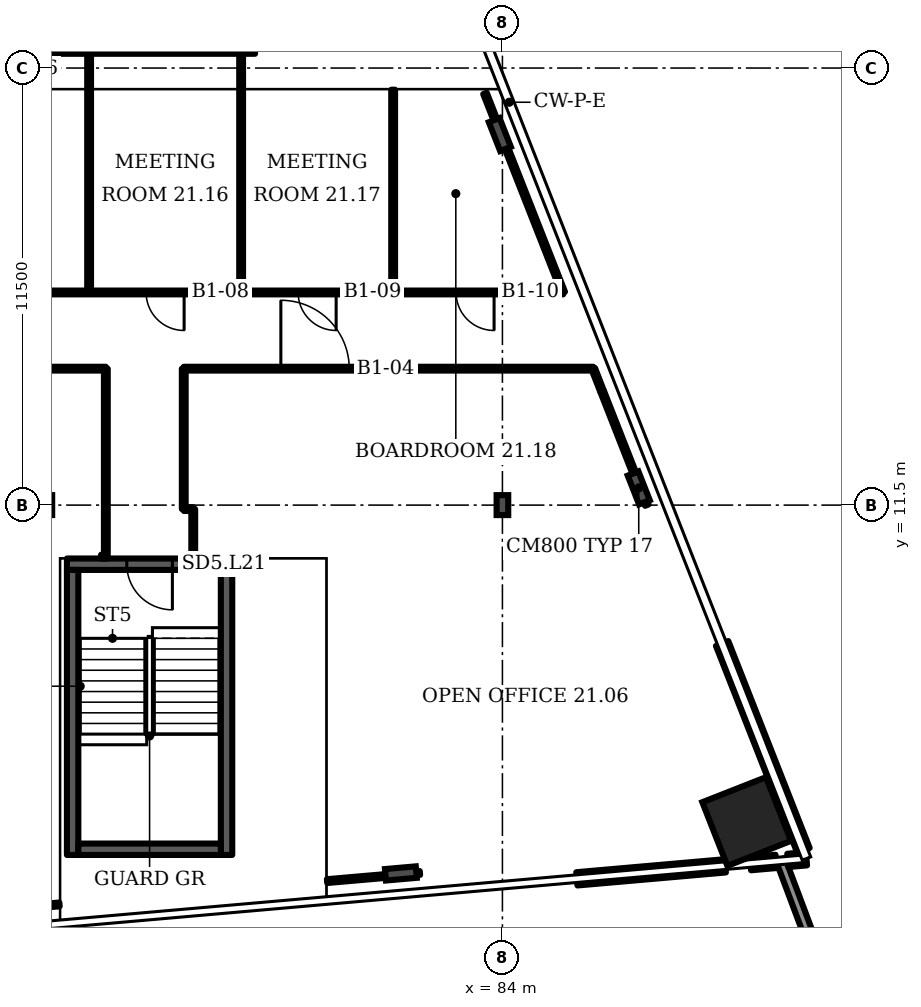
"""IFC4 building model, lengths in metres.
Left out: names, types, materials, properties, quantities, classifications, styles, units other than length and angle.
Written with IfcOpenShell. Run it as: python <this file> out.ifc"""

import sys

from ifc_helpers import new_model, si_unit, direction, frame, frame_2d, origin, origin_2d, place, context, subcontext, project, spatial, rectangle, i_section, extrude, element, fill, save


model = new_model("IFC4")
c1 = context("Model", 3, precision=1e-05, world=origin(), true_north=direction((0.0, 1.0)))
c2 = subcontext(c1, "Body", "Model", "MODEL_VIEW")
j1 = project(units=[si_unit("LENGTHUNIT", "METRE"), si_unit("PLANEANGLEUNIT", "RADIAN")], contexts=[c1])
p1 = place(None, origin())
s1 = spatial("IfcSite", under=j1, at=p1, CompositionType="ELEMENT")
p2 = place(p1, origin())
s2 = spatial("IfcBuilding", under=s1, at=p2, CompositionType="ELEMENT")
p3 = place(p2, frame((0.0, 0.0, 96.7)))
s3 = spatial("IfcBuildingStorey", under=s2, at=p3, CompositionType="ELEMENT", Elevation=96.7)
p4 = place(p3, frame((90.427, 3.174, 0.0), z_axis=(0.0, 0.0, 1.0), x_axis=(-0.365778, 0.930702, 0.0)))
e1 = element("IfcColumn", 1, at=p4, inside=s3, PredefinedType="COLUMN", context=c2, shape_type="SweptSolid", body=[
    extrude(rectangle(XDim=1.8, YDim=1.8, at=origin_2d()), origin(), (0.0, 0.0, 1.0), 3.6),
])
for number, where, z_axis, x_axis in (
    (2, (81.328, 1.808, 0.0), (0.0, 0.0, 1.0), (0.087, -0.996, 0.0)),
    (3, (87.587, 11.952, 0.0), (0.0, 0.0, 1.0), (0.931, 0.366, 0.0)),
    (4, (83.933, 21.251, 0.0), (0.0, 0.0, 1.0), (0.931, 0.366, 0.0)),
):
    element("IfcColumn", number, at=place(p3, frame(where, z_axis=z_axis, x_axis=x_axis)), inside=s3, PredefinedType="COLUMN", context=c2, shape_type="SweptSolid", body=[
        extrude(i_section(OverallWidth=0.303, OverallDepth=0.814, WebThickness=0.021, FlangeThickness=0.04, FilletRadius=0.03, at=origin_2d()), origin(), (0.0, 0.0, 1.0), 3.6),
    ])
p5 = place(p3, frame((84.0, 11.5, 0.0), z_axis=(0.0, 0.0, 1.0), x_axis=(1.0, 0.0, 0.0)))
e5 = element("IfcColumn", 5, at=p5, inside=s3, PredefinedType="COLUMN", context=c2, shape_type="SweptSolid", body=[
    extrude(i_section(OverallWidth=0.306, OverallDepth=0.524, WebThickness=0.021, FlangeThickness=0.04, FilletRadius=0.027, at=origin_2d()), origin(), (0.0, 0.0, 1.0), 3.6),
])
p6 = place(p3, frame((91.318, 2.174, 0.0), z_axis=(0.0, 0.0, 1.0), x_axis=(0.351075, -0.936343, 0.0)))
e6 = element("IfcWall", 6, at=p6, inside=s3, PredefinedType="PARAPET", context=c2, shape_type="SweptSolid", body=[
    extrude(rectangle(XDim=2.275, YDim=0.25, at=frame_2d((1.137, 0.0))), origin(), (0.0, 0.0, 1.0), 1.1),
])
p7 = place(p3, frame((85.959, 1.667, 0.0), z_axis=(0.0, 0.0, 1.0), x_axis=(0.996194, 0.087167, 0.0)))
e7 = element("IfcWall", 7, at=p7, inside=s3, PredefinedType="SOLIDWALL", context=c2, shape_type="SweptSolid", body=[
    extrude(rectangle(XDim=3.921, YDim=0.35, at=frame_2d((1.96, 0.0))), origin(), (0.0, 0.0, 1.0), 1.0),
])
p8 = place(p3, frame((90.527, 2.066, 0.0), z_axis=(0.0, 0.0, 1.0), x_axis=(0.996187, 0.087252, 0.0)))
e8 = element("IfcWall", 8, at=p8, inside=s3, PredefinedType="SOLIDWALL", context=c2, shape_type="SweptSolid", body=[
    extrude(rectangle(XDim=0.677, YDim=0.35, at=frame_2d((0.339, 0.0))), origin(), (0.0, 0.0, 1.0), 1.0),
])
p9 = place(p3, frame((91.51, 2.152, 0.0), z_axis=(0.0, 0.0, 1.0), x_axis=(0.996189, 0.087272, 0.0)))
e9 = element("IfcWall", 9, at=p9, inside=s3, PredefinedType="SOLIDWALL", context=c2, shape_type="SweptSolid", body=[
    extrude(rectangle(XDim=0.492, YDim=0.35, at=frame_2d((0.246, 0.0))), origin(), (0.0, 0.0, 1.0), 1.0),
])
p10 = place(p3, frame((91.921, 2.414, 0.0), z_axis=(0.0, 0.0, 1.0), x_axis=(-0.36578, 0.930701, 0.0)))
e10 = element("IfcWall", 10, at=p10, inside=s3, PredefinedType="SOLIDWALL", context=c2, shape_type="SweptSolid", body=[
    extrude(rectangle(XDim=5.852, YDim=0.35, at=frame_2d((2.926, 0.0))), origin(), (0.0, 0.0, 1.0), 1.0),
])
p11 = place(p3, frame((72.541, 9.945, 0.0), z_axis=(0.0, 0.0, 1.0), x_axis=(1.0, 0.0, 0.0)))
e11 = element("IfcWall", 11, at=p11, inside=s3, PredefinedType="SHEAR", context=c2, shape_type="SweptSolid", body=[
    extrude(rectangle(XDim=4.35, YDim=0.3, at=frame_2d((2.175, 0.0))), origin(), (0.0, 0.0, 1.0), 3.2),
])
p12 = place(p11, frame((1.575, 0.0, 0.0)))
e12 = element("IfcOpeningElement", 12, at=p12, cuts=e11, PredefinedType="OPENING", context=c2, shape_type="SweptSolid", body=[
    extrude(rectangle(XDim=1.2, YDim=2.1, at=frame_2d((0.6, 1.05))), frame((0.0, 0.16, 0.0), z_axis=(0.0, -1.0, 0.0), x_axis=(1.0, 0.0, 0.0)), (0.0, 0.0, 1.0), 0.32),
])
p13 = place(p3, frame((17.8, 17.095, 0.0), z_axis=(0.0, 0.0, 1.0), x_axis=(1.0, 0.0, 0.0)))
e13 = element("IfcWall", 13, at=p13, inside=s3, PredefinedType="PARTITIONING", context=c2, shape_type="SweptSolid", body=[
    extrude(rectangle(XDim=67.8, YDim=0.1, at=frame_2d((33.9, 0.0))), origin(), (0.0, 0.0, 1.0), 3.2),
])
p14 = place(p13, frame((12.0, 0.0, 0.0)))
e14 = element("IfcOpeningElement", 14, at=p14, cuts=e13, PredefinedType="OPENING", context=c2, shape_type="SweptSolid", body=[
    extrude(rectangle(XDim=1.0, YDim=2.1, at=frame_2d((0.5, 1.05))), frame((0.0, 0.06, 0.0), z_axis=(0.0, -1.0, 0.0), x_axis=(1.0, 0.0, 0.0)), (0.0, 0.0, 1.0), 0.12),
])
p15 = place(p13, frame((48.5, 0.0, 0.0)))
e15 = element("IfcOpeningElement", 15, at=p15, cuts=e13, PredefinedType="OPENING", context=c2, shape_type="SweptSolid", body=[
    extrude(rectangle(XDim=1.8, YDim=2.1, at=frame_2d((0.9, 1.05))), frame((0.0, 0.06, 0.0), z_axis=(0.0, -1.0, 0.0), x_axis=(1.0, 0.0, 0.0)), (0.0, 0.0, 1.0), 0.12),
])
p16 = place(p13, frame((56.825, 0.0, 0.0)))
e16 = element("IfcOpeningElement", 16, at=p16, cuts=e13, PredefinedType="OPENING", context=c2, shape_type="SweptSolid", body=[
    extrude(rectangle(XDim=1.0, YDim=2.1, at=frame_2d((0.5, 1.05))), frame((0.0, 0.06, 0.0), z_axis=(0.0, -1.0, 0.0), x_axis=(1.0, 0.0, 0.0)), (0.0, 0.0, 1.0), 0.12),
])
p17 = place(p13, frame((60.825, 0.0, 0.0)))
e17 = element("IfcOpeningElement", 17, at=p17, cuts=e13, PredefinedType="OPENING", context=c2, shape_type="SweptSolid", body=[
    extrude(rectangle(XDim=1.0, YDim=2.1, at=frame_2d((0.5, 1.05))), frame((0.0, 0.06, 0.0), z_axis=(0.0, -1.0, 0.0), x_axis=(1.0, 0.0, 0.0)), (0.0, 0.0, 1.0), 0.12),
])
p18 = place(p13, frame((64.981, 0.0, 0.0)))
e18 = element("IfcOpeningElement", 18, at=p18, cuts=e13, PredefinedType="OPENING", context=c2, shape_type="SweptSolid", body=[
    extrude(rectangle(XDim=1.0, YDim=2.1, at=frame_2d((0.5, 1.05))), frame((0.0, 0.06, 0.0), z_axis=(0.0, -1.0, 0.0), x_axis=(1.0, 0.0, 0.0)), (0.0, 0.0, 1.0), 0.12),
])
p19 = place(p3, frame((44.51, 15.09, 0.0), z_axis=(0.0, 0.0, 1.0), x_axis=(1.0, 0.0, 0.0)))
e19 = element("IfcWall", 19, at=p19, inside=s3, PredefinedType="PARTITIONING", context=c2, shape_type="SweptSolid", body=[
    extrude(rectangle(XDim=29.055, YDim=0.1, at=frame_2d((14.527, 0.0))), origin(), (0.0, 0.0, 1.0), 3.2),
])
p20 = place(p3, frame((69.91, 0.78, 0.0), z_axis=(0.0, 0.0, 1.0), x_axis=(0.99619, 0.087259, 0.0)))
e20 = element("IfcWall", 20, at=p20, inside=s3, PredefinedType="PARTITIONING", context=c2, shape_type="SweptSolid", body=[
    extrude(rectangle(XDim=2.445, YDim=0.1, at=frame_2d((1.223, 0.0))), origin(), (0.0, 0.0, 1.0), 2.58),
])
p21 = place(p3, frame((73.125, 17.095, 0.0), z_axis=(0.0, 0.0, 1.0), x_axis=(0.0, 1.0, 0.0)))
e21 = element("IfcWall", 21, at=p21, inside=s3, PredefinedType="PARTITIONING", context=c2, shape_type="SweptSolid", body=[
    extrude(rectangle(XDim=6.28, YDim=0.1, at=frame_2d((3.14, 0.0))), origin(), (0.0, 0.0, 1.0), 3.2),
])
p22 = place(p3, frame((73.44, 10.145, 0.0), z_axis=(0.0, 0.0, 1.0), x_axis=(1.0, 0.0, 0.0)))
e22 = element("IfcWall", 22, at=p22, inside=s3, PredefinedType="PARTITIONING", context=c2, shape_type="SweptSolid", body=[
    extrude(rectangle(XDim=0.125, YDim=0.1, at=frame_2d((0.062, 0.0))), origin(), (0.0, 0.0, 1.0), 3.2),
])
p23 = place(p3, frame((73.565, 10.095, 0.0), z_axis=(0.0, 0.0, 1.0), x_axis=(0.0, 1.0, 0.0)))
e23 = element("IfcWall", 23, at=p23, inside=s3, PredefinedType="PARTITIONING", context=c2, shape_type="SweptSolid", body=[
    extrude(rectangle(XDim=4.995, YDim=0.1, at=frame_2d((2.498, 0.0))), origin(), (0.0, 0.0, 1.0), 3.2),
])
p24 = place(p3, frame((75.615, 11.395, 0.0), z_axis=(0.0, 0.0, 1.0), x_axis=(0.0, 1.0, 0.0)))
e24 = element("IfcWall", 24, at=p24, inside=s3, PredefinedType="PARTITIONING", context=c2, shape_type="SweptSolid", body=[
    extrude(rectangle(XDim=3.695, YDim=0.1, at=frame_2d((1.848, 0.0))), origin(), (0.0, 0.0, 1.0), 3.2),
])
p25 = place(p3, frame((75.615, 15.09, 0.0), z_axis=(0.0, 0.0, 1.0), x_axis=(1.0, 0.0, 0.0)))
e25 = element("IfcWall", 25, at=p25, inside=s3, PredefinedType="PARTITIONING", context=c2, shape_type="SweptSolid", body=[
    extrude(rectangle(XDim=10.775, YDim=0.1, at=frame_2d((5.387, 0.0))), origin(), (0.0, 0.0, 1.0), 3.2),
])
p26 = place(p25, frame((2.555, 0.0, 0.0)))
e26 = element("IfcOpeningElement", 26, at=p26, cuts=e25, PredefinedType="OPENING", context=c2, shape_type="SweptSolid", body=[
    extrude(rectangle(XDim=1.8, YDim=2.1, at=frame_2d((0.9, 1.05))), frame((0.0, 0.06, 0.0), z_axis=(0.0, -1.0, 0.0), x_axis=(1.0, 0.0, 0.0)), (0.0, 0.0, 1.0), 0.12),
])
p27 = place(p3, frame((75.62, 11.395, 0.0), z_axis=(0.0, 0.0, 1.0), x_axis=(1.0, 0.0, 0.0)))
e27 = element("IfcWall", 27, at=p27, inside=s3, PredefinedType="PARTITIONING", context=c2, shape_type="SweptSolid", body=[
    extrude(rectangle(XDim=0.245, YDim=0.1, at=frame_2d((0.123, 0.0))), origin(), (0.0, 0.0, 1.0), 3.2),
])
p28 = place(p3, frame((75.865, 10.115, 0.0), z_axis=(0.0, 0.0, 1.0), x_axis=(0.0, 1.0, 0.0)))
e28 = element("IfcWall", 28, at=p28, inside=s3, PredefinedType="PARTITIONING", context=c2, shape_type="SweptSolid", body=[
    extrude(rectangle(XDim=1.28, YDim=0.1, at=frame_2d((0.64, 0.0))), origin(), (0.0, 0.0, 1.0), 3.2),
])
p29 = place(p3, frame((77.125, 17.095, 0.0), z_axis=(0.0, 0.0, 1.0), x_axis=(0.0, 1.0, 0.0)))
e29 = element("IfcWall", 29, at=p29, inside=s3, PredefinedType="PARTITIONING", context=c2, shape_type="SweptSolid", body=[
    extrude(rectangle(XDim=6.28, YDim=0.1, at=frame_2d((3.14, 0.0))), origin(), (0.0, 0.0, 1.0), 3.2),
])
p30 = place(p3, frame((79.386, 1.607, 0.0), z_axis=(0.0, 0.0, 1.0), x_axis=(0.996209, 0.086973, 0.0)))
e30 = element("IfcWall", 30, at=p30, inside=s3, PredefinedType="PARTITIONING", context=c2, shape_type="SweptSolid", body=[
    extrude(rectangle(XDim=2.453, YDim=0.1, at=frame_2d((1.227, 0.0))), origin(), (0.0, 0.0, 1.0), 2.58),
])
p31 = place(p3, frame((81.125, 17.095, 0.0), z_axis=(0.0, 0.0, 1.0), x_axis=(0.0, 1.0, 0.0)))
e31 = element("IfcWall", 31, at=p31, inside=s3, PredefinedType="PARTITIONING", context=c2, shape_type="SweptSolid", body=[
    extrude(rectangle(XDim=5.335, YDim=0.1, at=frame_2d((2.667, 0.0))), origin(), (0.0, 0.0, 1.0), 3.2),
])
p32 = place(p3, frame((83.96, 21.265, 0.0), z_axis=(0.0, 0.0, 1.0), x_axis=(-0.364889, 0.931052, 0.0)))
e32 = element("IfcWall", 32, at=p32, inside=s3, PredefinedType="PARTITIONING", context=c2, shape_type="SweptSolid", body=[
    extrude(rectangle(XDim=1.147, YDim=0.1, at=frame_2d((0.574, 0.0))), origin(), (0.0, 0.0, 1.0), 2.58),
])
p33 = place(p3, frame((85.6, 17.095, 0.0), z_axis=(0.0, 0.0, 1.0), x_axis=(-0.365997, 0.930617, 0.0)))
e33 = element("IfcWall", 33, at=p33, inside=s3, PredefinedType="PARTITIONING", context=c2, shape_type="SweptSolid", body=[
    extrude(rectangle(XDim=4.453, YDim=0.1, at=frame_2d((2.227, 0.0))), origin(), (0.0, 0.0, 1.0), 2.58),
])
p34 = place(p3, frame((86.62, 14.5, 0.0), z_axis=(0.0, 0.0, 1.0), x_axis=(-0.363469, 0.931606, 0.0)))
e34 = element("IfcWall", 34, at=p34, inside=s3, PredefinedType="PARTITIONING", context=c2, shape_type="SweptSolid", body=[
    extrude(rectangle(XDim=0.633, YDim=0.1, at=frame_2d((0.317, 0.0))), origin(), (0.0, 0.0, 1.0), 2.58),
])
p35 = place(p3, frame((87.8, 11.5, 0.0), z_axis=(0.0, 0.0, 1.0), x_axis=(-0.365764, 0.930711, 0.0)))
e35 = element("IfcWall", 35, at=p35, inside=s3, PredefinedType="PARTITIONING", context=c2, shape_type="SweptSolid", body=[
    extrude(rectangle(XDim=3.213, YDim=0.1, at=frame_2d((1.606, 0.0))), origin(), (0.0, 0.0, 1.0), 2.58),
])
for number, where, z_axis, x_axis in (
    (36, (72.691, 2.295, 0.0), (0.0, 0.0, 1.0), (0.0, 1.0, 0.0)),
    (37, (76.741, 2.295, 0.0), (0.0, 0.0, 1.0), (0.0, 1.0, 0.0)),
):
    element("IfcWall", number, at=place(p3, frame(where, z_axis=z_axis, x_axis=x_axis)), inside=s3, PredefinedType="SHEAR", context=c2, shape_type="SweptSolid", body=[
        extrude(rectangle(XDim=7.5, YDim=0.3, at=frame_2d((3.75, 0.0))), origin(), (0.0, 0.0, 1.0), 3.2),
    ])
p36 = place(p3, frame((72.841, 2.445, 0.0), z_axis=(0.0, 0.0, 1.0), x_axis=(1.0, 0.0, 0.0)))
e38 = element("IfcWall", 38, at=p36, inside=s3, PredefinedType="SHEAR", context=c2, shape_type="SweptSolid", body=[
    extrude(rectangle(XDim=3.75, YDim=0.3, at=frame_2d((1.875, 0.0))), origin(), (0.0, 0.0, 1.0), 3.2),
])
p37 = place(p3, frame((69.99, 23.525, 0.0), z_axis=(0.0, 0.0, 1.0), x_axis=(1.0, 0.0, 0.0)))
e39 = element("IfcWall", 39, at=p37, inside=s3, PredefinedType="SHEAR", context=c2, shape_type="SweptSolid", body=[
    extrude(rectangle(XDim=7.5, YDim=0.3, at=frame_2d((3.75, 0.0))), origin(), (0.0, 0.0, 1.0), 3.2),
])
p38 = place(p12, origin())
e40 = element("IfcDoor", 40, at=p38, inside=s3, OperationType="SINGLE_SWING_RIGHT", PredefinedType="DOOR", context=c2, shape_type="SweptSolid", body=[
    extrude(rectangle(XDim=1.2, YDim=2.1, at=frame_2d((0.6, 1.05))), frame((0.0, 0.025, 0.0), z_axis=(0.0, -1.0, 0.0), x_axis=(1.0, 0.0, 0.0)), (0.0, 0.0, 1.0), 0.05),
])
fill(e12, e40)
p39 = place(p26, origin())
e41 = element("IfcDoor", 41, at=p39, inside=s3, OperationType="DOUBLE_DOOR_SINGLE_SWING", PredefinedType="DOOR", context=c2, shape_type="SweptSolid", body=[
    extrude(rectangle(XDim=1.8, YDim=2.1, at=frame_2d((0.9, 1.05))), frame((0.0, 0.025, 0.0), z_axis=(0.0, -1.0, 0.0), x_axis=(1.0, 0.0, 0.0)), (0.0, 0.0, 1.0), 0.05),
])
fill(e26, e41)
p40 = place(p16, origin())
e42 = element("IfcDoor", 42, at=p40, inside=s3, OperationType="SINGLE_SWING_RIGHT", PredefinedType="DOOR", context=c2, shape_type="SweptSolid", body=[
    extrude(rectangle(XDim=1.0, YDim=2.1, at=frame_2d((0.5, 1.05))), frame((0.0, 0.025, 0.0), z_axis=(0.0, -1.0, 0.0), x_axis=(1.0, 0.0, 0.0)), (0.0, 0.0, 1.0), 0.05),
])
fill(e16, e42)
p41 = place(p17, origin())
e43 = element("IfcDoor", 43, at=p41, inside=s3, OperationType="SINGLE_SWING_RIGHT", PredefinedType="DOOR", context=c2, shape_type="SweptSolid", body=[
    extrude(rectangle(XDim=1.0, YDim=2.1, at=frame_2d((0.5, 1.05))), frame((0.0, 0.025, 0.0), z_axis=(0.0, -1.0, 0.0), x_axis=(1.0, 0.0, 0.0)), (0.0, 0.0, 1.0), 0.05),
])
fill(e17, e43)
p42 = place(p18, origin())
e44 = element("IfcDoor", 44, at=p42, inside=s3, OperationType="SINGLE_SWING_RIGHT", PredefinedType="DOOR", context=c2, shape_type="SweptSolid", body=[
    extrude(rectangle(XDim=1.0, YDim=2.1, at=frame_2d((0.5, 1.05))), frame((0.0, 0.025, 0.0), z_axis=(0.0, -1.0, 0.0), x_axis=(1.0, 0.0, 0.0)), (0.0, 0.0, 1.0), 0.05),
])
fill(e18, e44)
save(model, sys.argv[1])
